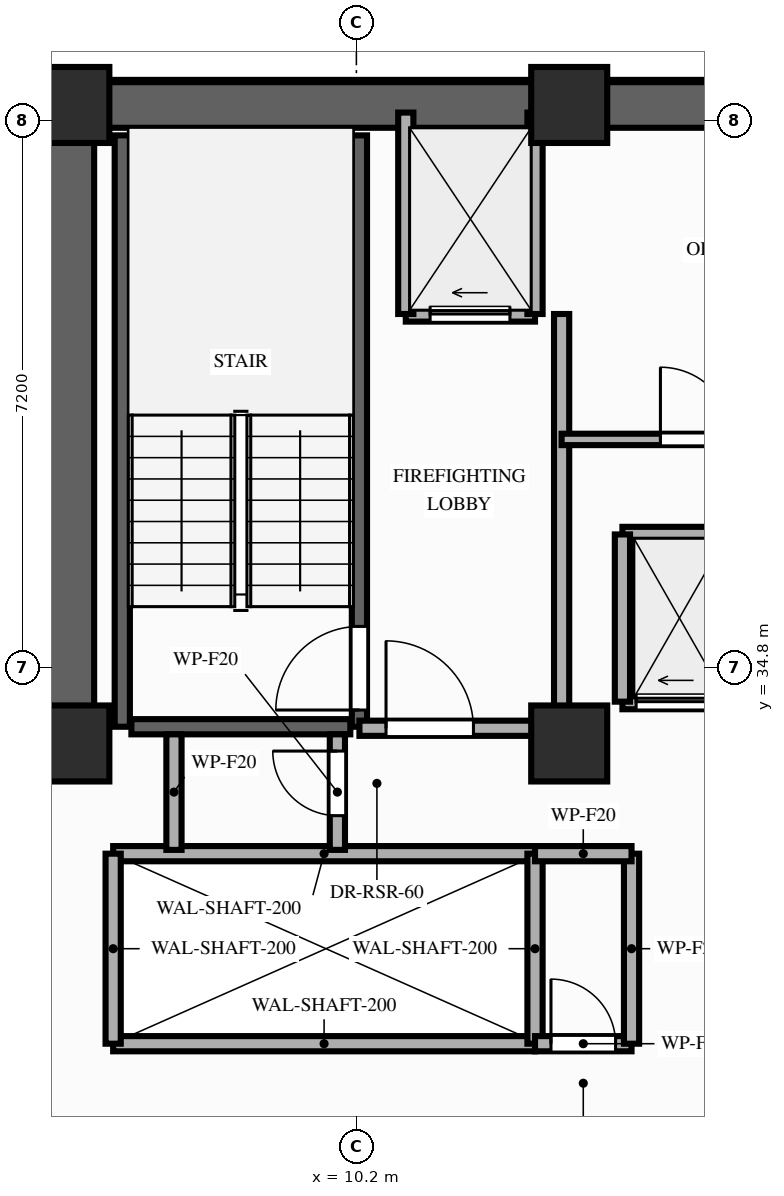
"""IFC4 building model, lengths in metres.
Left out: names, types, materials, properties, quantities, classifications, styles, units other than length and angle.
Written with IfcOpenShell. Run it as: python <this file> out.ifc"""

import sys

from ifc_helpers import new_model, si_unit, direction, frame, frame_2d, origin, origin_2d, place, context, subcontext, project, spatial, rectangle, extrude, element, fill, save


model = new_model("IFC4")
c1 = context("Model", 3, precision=1e-05, world=origin(), true_north=direction((0.0, 1.0)))
c2 = subcontext(c1, "Body", "Model", "MODEL_VIEW")
j1 = project(units=[si_unit("LENGTHUNIT", "METRE"), si_unit("PLANEANGLEUNIT", "RADIAN")], contexts=[c1])
p1 = place(None, origin())
s1 = spatial("IfcSite", under=j1, at=p1, CompositionType="ELEMENT")
p2 = place(p1, origin())
s2 = spatial("IfcBuilding", under=s1, at=p2, CompositionType="ELEMENT")
p3 = place(p2, frame((0.0, 0.0, 129.8)))
s3 = spatial("IfcBuildingStorey", under=s2, at=p3, CompositionType="ELEMENT", Elevation=129.8)
for number, where, z_axis, x_axis in (
    (1, (6.45, 33.8, 0.0), (0.0, 0.0, 1.0), (1.0, 0.0, 0.0)),
    (2, (13.0, 33.8, 0.0), (0.0, 0.0, 1.0), (1.0, 0.0, 0.0)),
    (3, (6.45, 42.2, 0.0), (0.0, 0.0, 1.0), (1.0, 0.0, 0.0)),
    (4, (13.0, 42.2, 0.0), (0.0, 0.0, 1.0), (1.0, 0.0, 0.0)),
):
    element("IfcColumn", number, at=place(p3, frame(where, z_axis=z_axis, x_axis=x_axis)), inside=s3, PredefinedType="COLUMN", context=c2, shape_type="SweptSolid", body=[
        extrude(rectangle(XDim=1.0, YDim=1.0, at=origin_2d()), origin(), (0.0, 0.0, 1.0), 3.2),
    ])
p4 = place(p3, frame((6.45, 42.2, 0.0), z_axis=(0.0, 0.0, 1.0), x_axis=(1.0, 0.0, 0.0)))
e5 = element("IfcWall", 5, at=p4, inside=s3, PredefinedType="SHEAR", context=c2, shape_type="SweptSolid", body=[
    extrude(rectangle(XDim=20.45, YDim=0.6, at=frame_2d((10.225, 0.0))), origin(), (0.0, 0.0, 1.0), 3.02),
])
p5 = place(p3, frame((6.45, 33.8, 0.0), z_axis=(0.0, 0.0, 1.0), x_axis=(0.0, 1.0, 0.0)))
e6 = element("IfcWall", 6, at=p5, inside=s3, PredefinedType="SHEAR", context=c2, shape_type="SweptSolid", body=[
    extrude(rectangle(XDim=7.95, YDim=0.6, at=frame_2d((3.975, 0.0))), origin(), (0.0, 0.0, 1.0), 3.02),
])
p6 = place(p3, frame((7.12, 34.02, 0.0), z_axis=(0.0, 0.0, 1.0), x_axis=(0.0, 1.0, 0.0)))
e7 = element("IfcWall", 7, at=p6, inside=s3, PredefinedType="SHEAR", context=c2, shape_type="SweptSolid", body=[
    extrude(rectangle(XDim=7.78, YDim=0.2, at=frame_2d((3.89, 0.0))), origin(), (0.0, 0.0, 1.0), 3.02),
])
p7 = place(p3, frame((10.24, 34.02, 0.0), z_axis=(0.0, 0.0, 1.0), x_axis=(0.0, 1.0, 0.0)))
e8 = element("IfcWall", 8, at=p7, inside=s3, PredefinedType="SHEAR", context=c2, shape_type="SweptSolid", body=[
    extrude(rectangle(XDim=7.78, YDim=0.2, at=frame_2d((3.89, 0.0))), origin(), (0.0, 0.0, 1.0), 3.02),
])
p8 = place(p7, frame((0.22, 0.0, 0.0)))
e9 = element("IfcOpeningElement", 9, at=p8, cuts=e8, PredefinedType="OPENING", context=c2, shape_type="SweptSolid", body=[
    extrude(rectangle(XDim=1.1, YDim=2.15, at=frame_2d((0.55, 1.075))), frame((0.0, 0.11, 0.0), z_axis=(0.0, -1.0, 0.0), x_axis=(1.0, 0.0, 0.0)), (0.0, 0.0, 1.0), 0.22),
])
p9 = place(p3, frame((7.24, 34.02, 0.0), z_axis=(0.0, 0.0, 1.0), x_axis=(1.0, 0.0, 0.0)))
e10 = element("IfcWall", 10, at=p9, inside=s3, PredefinedType="SHEAR", context=c2, shape_type="SweptSolid", body=[
    extrude(rectangle(XDim=2.88, YDim=0.2, at=frame_2d((1.44, 0.0))), origin(), (0.0, 0.0, 1.0), 3.02),
])
for number, where, z_axis, x_axis in (
    (11, (7.0, 29.85, 0.0), (0.0, 0.0, 1.0), (1.0, 0.0, 0.0)),
    (12, (7.0, 32.35, 0.0), (0.0, 0.0, 1.0), (1.0, 0.0, 0.0)),
):
    element("IfcWall", number, at=place(p3, frame(where, z_axis=z_axis, x_axis=x_axis)), inside=s3, PredefinedType="MOVABLE", context=c2, shape_type="SweptSolid", body=[
        extrude(rectangle(XDim=5.55, YDim=0.2, at=frame_2d((2.775, 0.0))), origin(), (0.0, 0.0, 1.0), 3.02),
    ])
for number, where, z_axis, x_axis in (
    (13, (7.0, 29.85, 0.0), (0.0, 0.0, 1.0), (0.0, 1.0, 0.0)),
    (14, (12.55, 29.85, 0.0), (0.0, 0.0, 1.0), (0.0, 1.0, 0.0)),
):
    element("IfcWall", number, at=place(p3, frame(where, z_axis=z_axis, x_axis=x_axis)), inside=s3, PredefinedType="MOVABLE", context=c2, shape_type="SweptSolid", body=[
        extrude(rectangle(XDim=2.5, YDim=0.2, at=frame_2d((1.25, 0.0))), origin(), (0.0, 0.0, 1.0), 3.02),
    ])
p10 = place(p3, frame((10.85, 39.45, 0.0), z_axis=(0.0, 0.0, 1.0), x_axis=(1.0, 0.0, 0.0)))
e15 = element("IfcWall", 15, at=p10, inside=s3, PredefinedType="MOVABLE", context=c2, shape_type="SweptSolid", body=[
    extrude(rectangle(XDim=1.7, YDim=0.2, at=frame_2d((0.85, 0.0))), origin(), (0.0, 0.0, 1.0), 3.02),
])
p11 = place(p10, frame((0.32, 0.0, 0.0)))
e16 = element("IfcOpeningElement", 16, at=p11, cuts=e15, PredefinedType="OPENING", context=c2, shape_type="SweptSolid", body=[
    extrude(rectangle(XDim=1.05, YDim=2.15, at=frame_2d((0.525, 1.075))), frame((0.0, 0.11, 0.0), z_axis=(0.0, -1.0, 0.0), x_axis=(1.0, 0.0, 0.0)), (0.0, 0.0, 1.0), 0.22),
])
for number, where, z_axis, x_axis in (
    (17, (10.85, 39.45, 0.0), (0.0, 0.0, 1.0), (0.0, 1.0, 0.0)),
    (18, (12.55, 39.45, 0.0), (0.0, 0.0, 1.0), (0.0, 1.0, 0.0)),
):
    element("IfcWall", number, at=place(p3, frame(where, z_axis=z_axis, x_axis=x_axis)), inside=s3, PredefinedType="MOVABLE", context=c2, shape_type="SweptSolid", body=[
        extrude(rectangle(XDim=2.65, YDim=0.2, at=frame_2d((1.325, 0.0))), origin(), (0.0, 0.0, 1.0), 2.45),
    ])
p12 = place(p3, frame((12.9, 34.0, 0.0), z_axis=(0.0, 0.0, 1.0), x_axis=(0.0, 1.0, 0.0)))
e19 = element("IfcWall", 19, at=p12, inside=s3, PredefinedType="PARTITIONING", context=c2, shape_type="SweptSolid", body=[
    extrude(rectangle(XDim=5.45, YDim=0.2, at=frame_2d((2.725, 0.0))), origin(), (0.0, 0.0, 1.0), 2.45),
])
p13 = place(p3, frame((10.24, 34.0, 0.0), z_axis=(0.0, 0.0, 1.0), x_axis=(1.0, 0.0, 0.0)))
e20 = element("IfcWall", 20, at=p13, inside=s3, PredefinedType="PARTITIONING", context=c2, shape_type="SweptSolid", body=[
    extrude(rectangle(XDim=2.66, YDim=0.2, at=frame_2d((1.33, 0.0))), origin(), (0.0, 0.0, 1.0), 2.45),
])
p14 = place(p13, frame((0.35, 0.0, 0.0)))
e21 = element("IfcOpeningElement", 21, at=p14, cuts=e20, PredefinedType="OPENING", context=c2, shape_type="SweptSolid", body=[
    extrude(rectangle(XDim=1.15, YDim=2.15, at=frame_2d((0.575, 1.075))), frame((0.0, 0.11, 0.0), z_axis=(0.0, -1.0, 0.0), x_axis=(1.0, 0.0, 0.0)), (0.0, 0.0, 1.0), 0.22),
])
p15 = place(p3, frame((12.55, 29.85, 0.0), z_axis=(0.0, 0.0, 1.0), x_axis=(1.0, 0.0, 0.0)))
e22 = element("IfcWall", 22, at=p15, inside=s3, PredefinedType="PARTITIONING", context=c2, shape_type="SweptSolid", body=[
    extrude(rectangle(XDim=1.27, YDim=0.2, at=frame_2d((0.635, 0.0))), origin(), (0.0, 0.0, 1.0), 3.02),
])
p16 = place(p15, frame((0.21, 0.0, 0.0)))
e23 = element("IfcOpeningElement", 23, at=p16, cuts=e22, PredefinedType="OPENING", context=c2, shape_type="SweptSolid", body=[
    extrude(rectangle(XDim=0.85, YDim=2.05, at=frame_2d((0.425, 1.025))), frame((0.0, 0.11, 0.0), z_axis=(0.0, -1.0, 0.0), x_axis=(1.0, 0.0, 0.0)), (0.0, 0.0, 1.0), 0.22),
])
p17 = place(p3, frame((13.82, 29.85, 0.0), z_axis=(0.0, 0.0, 1.0), x_axis=(0.0, 1.0, 0.0)))
e24 = element("IfcWall", 24, at=p17, inside=s3, PredefinedType="PARTITIONING", context=c2, shape_type="SweptSolid", body=[
    extrude(rectangle(XDim=2.5, YDim=0.2, at=frame_2d((1.25, 0.0))), origin(), (0.0, 0.0, 1.0), 3.02),
])
p18 = place(p3, frame((12.55, 32.35, 0.0), z_axis=(0.0, 0.0, 1.0), x_axis=(1.0, 0.0, 0.0)))
e25 = element("IfcWall", 25, at=p18, inside=s3, PredefinedType="PARTITIONING", context=c2, shape_type="SweptSolid", body=[
    extrude(rectangle(XDim=1.27, YDim=0.2, at=frame_2d((0.635, 0.0))), origin(), (0.0, 0.0, 1.0), 3.02),
])
p19 = place(p3, frame((7.8, 32.4, 0.0), z_axis=(0.0, 0.0, 1.0), x_axis=(0.0, 1.0, 0.0)))
e26 = element("IfcWall", 26, at=p19, inside=s3, PredefinedType="PARTITIONING", context=c2, shape_type="SweptSolid", body=[
    extrude(rectangle(XDim=1.52, YDim=0.2, at=frame_2d((0.76, 0.0))), origin(), (0.0, 0.0, 1.0), 2.45),
])
p20 = place(p3, frame((9.95, 32.4, 0.0), z_axis=(0.0, 0.0, 1.0), x_axis=(0.0, 1.0, 0.0)))
e27 = element("IfcWall", 27, at=p20, inside=s3, PredefinedType="PARTITIONING", context=c2, shape_type="SweptSolid", body=[
    extrude(rectangle(XDim=1.52, YDim=0.2, at=frame_2d((0.76, 0.0))), origin(), (0.0, 0.0, 1.0), 2.45),
])
p21 = place(p20, frame((0.45, 0.0, 0.0)))
e28 = element("IfcOpeningElement", 28, at=p21, cuts=e27, PredefinedType="OPENING", context=c2, shape_type="SweptSolid", body=[
    extrude(rectangle(XDim=0.85, YDim=2.05, at=frame_2d((0.425, 1.025))), frame((0.0, 0.11, 0.0), z_axis=(0.0, -1.0, 0.0), x_axis=(1.0, 0.0, 0.0)), (0.0, 0.0, 1.0), 0.22),
])
p22 = place(p3, frame((12.9, 37.8, 0.0), z_axis=(0.0, 0.0, 1.0), x_axis=(1.0, 0.0, 0.0)))
e29 = element("IfcWall", 29, at=p22, inside=s3, PredefinedType="PARTITIONING", context=c2, shape_type="SweptSolid", body=[
    extrude(rectangle(XDim=7.6, YDim=0.15, at=frame_2d((3.8, 0.0))), origin(), (0.0, 0.0, 1.0), 3.02),
])
p23 = place(p22, frame((1.3, 0.0, 0.0)))
e30 = element("IfcOpeningElement", 30, at=p23, cuts=e29, PredefinedType="OPENING", context=c2, shape_type="SweptSolid", body=[
    extrude(rectangle(XDim=0.95, YDim=2.15, at=frame_2d((0.475, 1.075))), frame((0.0, 0.085, 0.0), z_axis=(0.0, -1.0, 0.0), x_axis=(1.0, 0.0, 0.0)), (0.0, 0.0, 1.0), 0.17),
])
p24 = place(p22, frame((5.1, 0.0, 0.0)))
e31 = element("IfcOpeningElement", 31, at=p24, cuts=e29, PredefinedType="OPENING", context=c2, shape_type="SweptSolid", body=[
    extrude(rectangle(XDim=0.95, YDim=2.15, at=frame_2d((0.475, 1.075))), frame((0.0, 0.085, 0.0), z_axis=(0.0, -1.0, 0.0), x_axis=(1.0, 0.0, 0.0)), (0.0, 0.0, 1.0), 0.17),
])
p25 = place(p3, frame((13.7, 34.35, 0.0), z_axis=(0.0, 0.0, 1.0), x_axis=(1.0, 0.0, 0.0)))
e32 = element("IfcWall", 32, at=p25, inside=s3, PredefinedType="MOVABLE", context=c2, shape_type="SweptSolid", body=[
    extrude(rectangle(XDim=5.42, YDim=0.2, at=frame_2d((2.71, 0.0))), origin(), (0.0, 0.0, 1.0), 3.02),
])
p26 = place(p25, frame((0.18, 0.0, 0.0)))
e33 = element("IfcOpeningElement", 33, at=p26, cuts=e32, PredefinedType="OPENING", context=c2, shape_type="SweptSolid", body=[
    extrude(rectangle(XDim=1.05, YDim=2.15, at=frame_2d((0.525, 1.075))), frame((0.0, 0.11, 0.0), z_axis=(0.0, -1.0, 0.0), x_axis=(1.0, 0.0, 0.0)), (0.0, 0.0, 1.0), 0.22),
])
p27 = place(p25, frame((1.47, 0.0, 0.0)))
e34 = element("IfcOpeningElement", 34, at=p27, cuts=e32, PredefinedType="OPENING", context=c2, shape_type="SweptSolid", body=[
    extrude(rectangle(XDim=1.05, YDim=2.15, at=frame_2d((0.525, 1.075))), frame((0.0, 0.11, 0.0), z_axis=(0.0, -1.0, 0.0), x_axis=(1.0, 0.0, 0.0)), (0.0, 0.0, 1.0), 0.22),
])
p28 = place(p25, frame((2.78, 0.0, 0.0)))
e35 = element("IfcOpeningElement", 35, at=p28, cuts=e32, PredefinedType="OPENING", context=c2, shape_type="SweptSolid", body=[
    extrude(rectangle(XDim=1.05, YDim=2.15, at=frame_2d((0.525, 1.075))), frame((0.0, 0.11, 0.0), z_axis=(0.0, -1.0, 0.0), x_axis=(1.0, 0.0, 0.0)), (0.0, 0.0, 1.0), 0.22),
])
p29 = place(p25, frame((4.08, 0.0, 0.0)))
e36 = element("IfcOpeningElement", 36, at=p29, cuts=e32, PredefinedType="OPENING", context=c2, shape_type="SweptSolid", body=[
    extrude(rectangle(XDim=1.05, YDim=2.15, at=frame_2d((0.525, 1.075))), frame((0.0, 0.11, 0.0), z_axis=(0.0, -1.0, 0.0), x_axis=(1.0, 0.0, 0.0)), (0.0, 0.0, 1.0), 0.22),
])
p30 = place(p3, frame((13.7, 36.55, 0.0), z_axis=(0.0, 0.0, 1.0), x_axis=(1.0, 0.0, 0.0)))
e37 = element("IfcWall", 37, at=p30, inside=s3, PredefinedType="MOVABLE", context=c2, shape_type="SweptSolid", body=[
    extrude(rectangle(XDim=5.42, YDim=0.2, at=frame_2d((2.71, 0.0))), origin(), (0.0, 0.0, 1.0), 3.02),
])
p31 = place(p3, frame((13.7, 34.35, 0.0), z_axis=(0.0, 0.0, 1.0), x_axis=(0.0, 1.0, 0.0)))
e38 = element("IfcWall", 38, at=p31, inside=s3, PredefinedType="MOVABLE", context=c2, shape_type="SweptSolid", body=[
    extrude(rectangle(XDim=2.2, YDim=0.2, at=frame_2d((1.1, 0.0))), origin(), (0.0, 0.0, 1.0), 3.02),
])
p32 = place(p8, origin())
e39 = element("IfcDoor", 39, at=p32, inside=s3, OperationType="SINGLE_SWING_LEFT", PredefinedType="DOOR", context=c2, shape_type="SweptSolid", body=[
    extrude(rectangle(XDim=1.1, YDim=2.15, at=frame_2d((0.55, 1.075))), frame((0.0, 0.025, 0.0), z_axis=(0.0, -1.0, 0.0), x_axis=(1.0, 0.0, 0.0)), (0.0, 0.0, 1.0), 0.05),
])
fill(e9, e39)
p33 = place(p11, origin())
e40 = element("IfcDoor", 40, at=p33, inside=s3, OperationType="SLIDING_TO_LEFT", PredefinedType="DOOR", context=c2, shape_type="SweptSolid", body=[
    extrude(rectangle(XDim=1.05, YDim=2.15, at=frame_2d((0.525, 1.075))), frame((0.0, 0.025, 0.0), z_axis=(0.0, -1.0, 0.0), x_axis=(1.0, 0.0, 0.0)), (0.0, 0.0, 1.0), 0.05),
])
fill(e16, e40)
p34 = place(p14, origin())
e41 = element("IfcDoor", 41, at=p34, inside=s3, OperationType="SINGLE_SWING_LEFT", PredefinedType="DOOR", context=c2, shape_type="SweptSolid", body=[
    extrude(rectangle(XDim=1.15, YDim=2.15, at=frame_2d((0.575, 1.075))), frame((0.0, 0.025, 0.0), z_axis=(0.0, -1.0, 0.0), x_axis=(1.0, 0.0, 0.0)), (0.0, 0.0, 1.0), 0.05),
])
fill(e21, e41)
p35 = place(p16, origin())
e42 = element("IfcDoor", 42, at=p35, inside=s3, OperationType="SINGLE_SWING_LEFT", PredefinedType="DOOR", context=c2, shape_type="SweptSolid", body=[
    extrude(rectangle(XDim=0.85, YDim=2.05, at=frame_2d((0.425, 1.025))), frame((0.0, 0.025, 0.0), z_axis=(0.0, -1.0, 0.0), x_axis=(1.0, 0.0, 0.0)), (0.0, 0.0, 1.0), 0.05),
])
fill(e23, e42)
p36 = place(p21, origin())
e43 = element("IfcDoor", 43, at=p36, inside=s3, OperationType="SINGLE_SWING_RIGHT", PredefinedType="DOOR", context=c2, shape_type="SweptSolid", body=[
    extrude(rectangle(XDim=0.85, YDim=2.05, at=frame_2d((0.425, 1.025))), frame((0.0, 0.025, 0.0), z_axis=(0.0, -1.0, 0.0), x_axis=(1.0, 0.0, 0.0)), (0.0, 0.0, 1.0), 0.05),
])
fill(e28, e43)
p37 = place(p23, origin())
e44 = element("IfcDoor", 44, at=p37, inside=s3, OperationType="SINGLE_SWING_LEFT", PredefinedType="DOOR", context=c2, shape_type="SweptSolid", body=[
    extrude(rectangle(XDim=0.95, YDim=2.15, at=frame_2d((0.475, 1.075))), frame((0.0, 0.025, 0.0), z_axis=(0.0, -1.0, 0.0), x_axis=(1.0, 0.0, 0.0)), (0.0, 0.0, 1.0), 0.05),
])
fill(e30, e44)
p38 = place(p26, origin())
e45 = element("IfcDoor", 45, at=p38, inside=s3, OperationType="SLIDING_TO_LEFT", PredefinedType="DOOR", context=c2, shape_type="SweptSolid", body=[
    extrude(rectangle(XDim=1.05, YDim=2.15, at=frame_2d((0.525, 1.075))), frame((0.0, 0.025, 0.0), z_axis=(0.0, -1.0, 0.0), x_axis=(1.0, 0.0, 0.0)), (0.0, 0.0, 1.0), 0.05),
])
fill(e33, e45)
save(model, sys.argv[1])
